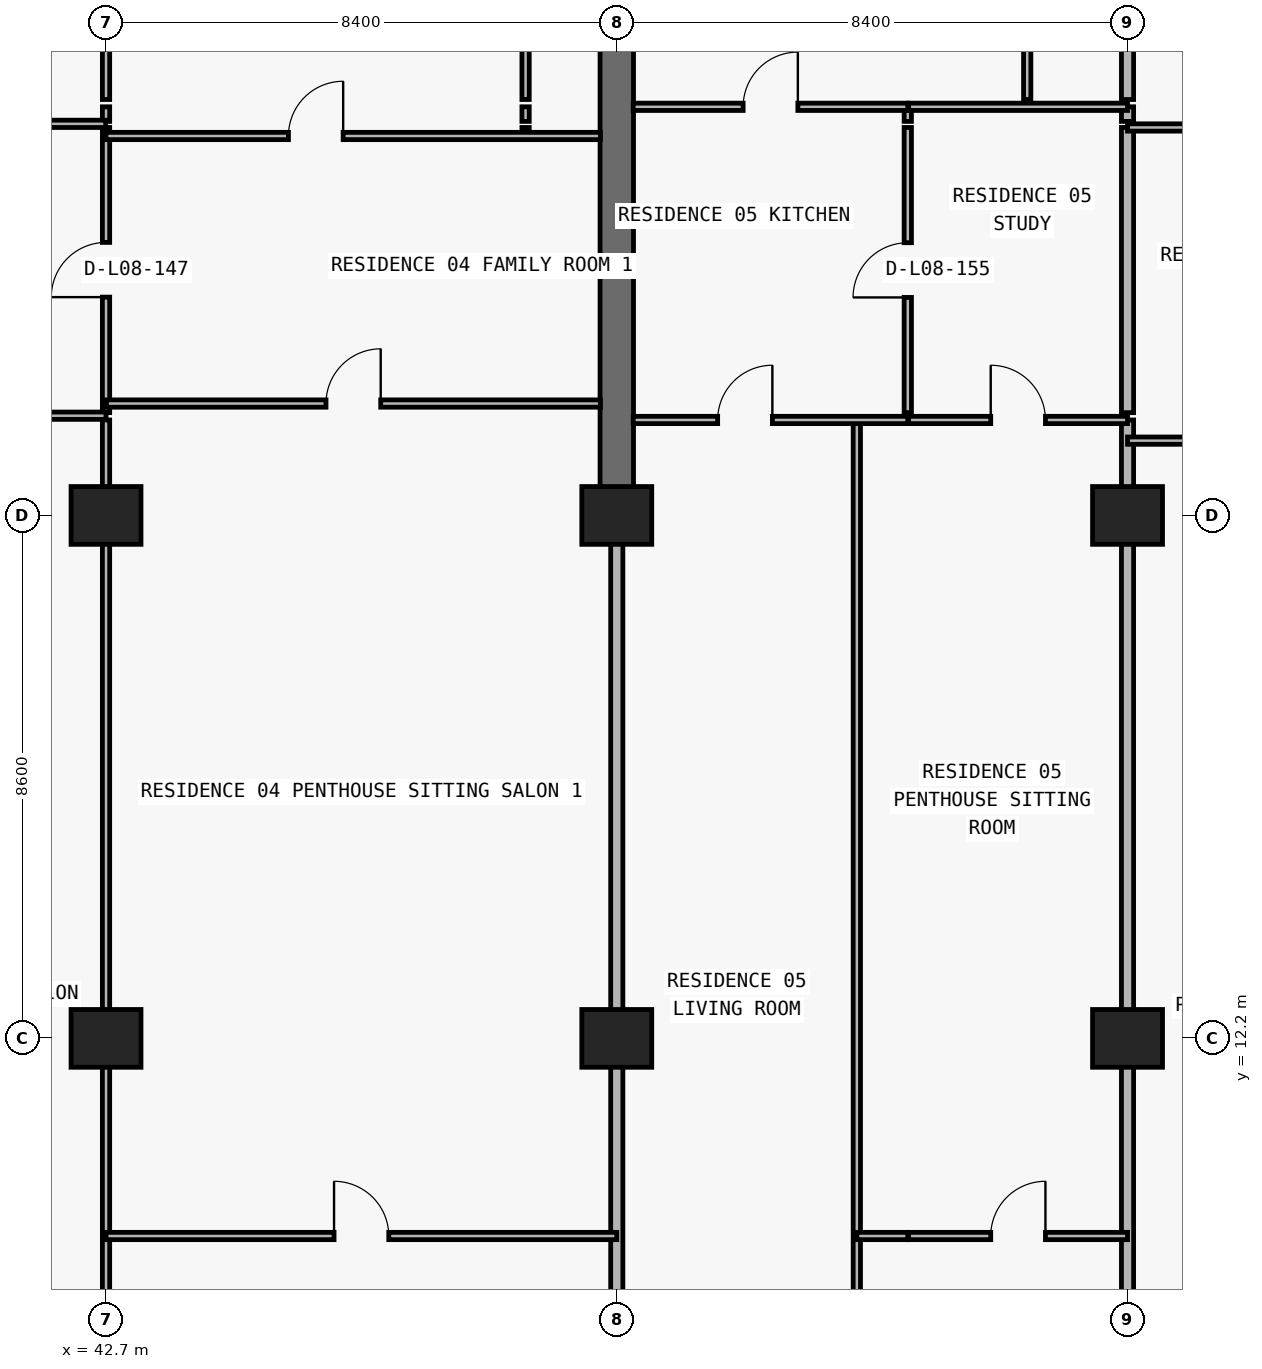
"""IFC4 building model, lengths in metres.
Left out: names, types, materials, properties, quantities, classifications, styles, units other than length and angle.
Written with IfcOpenShell. Run it as: python <this file> out.ifc"""

import sys

from ifc_helpers import new_model, si_unit, direction, frame, frame_2d, origin, origin_2d, place, context, subcontext, project, spatial, rectangle, extrude, element, fill, save


model = new_model("IFC4")
c1 = context("Model", 3, precision=1e-05, world=origin(), true_north=direction((0.0, 1.0)))
c2 = subcontext(c1, "Body", "Model", "MODEL_VIEW")
j1 = project(units=[si_unit("LENGTHUNIT", "METRE"), si_unit("PLANEANGLEUNIT", "RADIAN")], contexts=[c1])
p1 = place(None, origin())
s1 = spatial("IfcSite", under=j1, at=p1, CompositionType="ELEMENT")
p2 = place(p1, origin())
s2 = spatial("IfcBuilding", under=s1, at=p2, CompositionType="ELEMENT")
p3 = place(p2, frame((0.0, 0.0, 36.6)))
s3 = spatial("IfcBuildingStorey", under=s2, at=p3, CompositionType="ELEMENT", Elevation=36.6)
for number, where, z_axis, x_axis in (
    (1, (42.7, 12.2, 0.0), (0.0, 0.0, 1.0), (1.0, 0.0, 0.0)),
    (2, (51.1, 12.2, 0.0), (0.0, 0.0, 1.0), (1.0, 0.0, 0.0)),
    (3, (59.5, 12.2, 0.0), (0.0, 0.0, 1.0), (1.0, 0.0, 0.0)),
    (4, (42.7, 20.8, 0.0), (0.0, 0.0, 1.0), (1.0, 0.0, 0.0)),
    (5, (51.1, 20.8, 0.0), (0.0, 0.0, 1.0), (1.0, 0.0, 0.0)),
    (6, (59.5, 20.8, 0.0), (0.0, 0.0, 1.0), (1.0, 0.0, 0.0)),
):
    element("IfcColumn", number, at=place(p3, frame(where, z_axis=z_axis, x_axis=x_axis)), inside=s3, PredefinedType="COLUMN", context=c2, shape_type="SweptSolid", body=[
        extrude(rectangle(XDim=1.15, YDim=0.95, at=origin_2d()), origin(), (0.0, 0.0, 1.0), 3.05),
    ])
p4 = place(p3, frame((51.1, 20.8, 0.0), z_axis=(0.0, 0.0, 1.0), x_axis=(0.0, 1.0, 0.0)))
e7 = element("IfcWall", 7, at=p4, inside=s3, PredefinedType="SHEAR", context=c2, shape_type="SweptSolid", body=[
    extrude(rectangle(XDim=8.6, YDim=0.55, at=frame_2d((4.3, 0.0))), origin(), (0.0, 0.0, 1.0), 3.05),
])
p5 = place(p3, frame((42.7, 6.24, 0.0), z_axis=(0.0, 0.0, 1.0), x_axis=(0.0, 1.0, 0.0)))
e8 = element("IfcWall", 8, at=p5, inside=s3, PredefinedType="PARTITIONING", context=c2, shape_type="SweptSolid", body=[
    extrude(rectangle(XDim=16.13, YDim=0.12, at=frame_2d((8.065, 0.0))), origin(), (0.0, 0.0, 1.0), 2.11),
])
p6 = place(p3, frame((42.7, 22.49, 0.0), z_axis=(0.0, 0.0, 1.0), x_axis=(0.0, 1.0, 0.0)))
e9 = element("IfcWall", 9, at=p6, inside=s3, PredefinedType="PARTITIONING", context=c2, shape_type="SweptSolid", body=[
    extrude(rectangle(XDim=4.69, YDim=0.12, at=frame_2d((2.345, 0.0))), origin(), (0.0, 0.0, 1.0), 2.11),
])
p7 = place(p6, frame((1.9, 0.0, 0.0)))
e10 = element("IfcOpeningElement", 10, at=p7, cuts=e9, PredefinedType="OPENING", context=c2, shape_type="SweptSolid", body=[
    extrude(rectangle(XDim=0.9, YDim=2.06, at=frame_2d((0.45, 1.03))), frame((0.0, 0.07, 0.0), z_axis=(0.0, -1.0, 0.0), x_axis=(1.0, 0.0, 0.0)), (0.0, 0.0, 1.0), 0.14),
])
p8 = place(p3, frame((42.7, 27.28, 0.0), z_axis=(0.0, 0.0, 1.0), x_axis=(0.0, 1.0, 0.0)))
e11 = element("IfcWall", 11, at=p8, inside=s3, PredefinedType="PARTITIONING", context=c2, shape_type="SweptSolid", body=[
    extrude(rectangle(XDim=0.24, YDim=0.12, at=frame_2d((0.12, 0.0))), origin(), (0.0, 0.0, 1.0), 2.11),
])
p9 = place(p3, frame((42.7, 27.64, 0.0), z_axis=(0.0, 0.0, 1.0), x_axis=(0.0, 1.0, 0.0)))
e12 = element("IfcWall", 12, at=p9, inside=s3, PredefinedType="PARTITIONING", context=c2, shape_type="SweptSolid", body=[
    extrude(rectangle(XDim=6.86, YDim=0.12, at=frame_2d((3.43, 0.0))), origin(), (0.0, 0.0, 1.0), 2.11),
])
p10 = place(p3, frame((49.6, 27.04, 0.0), z_axis=(0.0, 0.0, 1.0), x_axis=(0.0, 1.0, 0.0)))
e13 = element("IfcWall", 13, at=p10, inside=s3, PredefinedType="PARTITIONING", context=c2, shape_type="SweptSolid", body=[
    extrude(rectangle(XDim=0.14, YDim=0.12, at=frame_2d((0.07, 0.0))), origin(), (0.0, 0.0, 1.0), 3.05),
])
p11 = place(p3, frame((49.6, 27.28, 0.0), z_axis=(0.0, 0.0, 1.0), x_axis=(0.0, 1.0, 0.0)))
e14 = element("IfcWall", 14, at=p11, inside=s3, PredefinedType="PARTITIONING", context=c2, shape_type="SweptSolid", body=[
    extrude(rectangle(XDim=0.24, YDim=0.12, at=frame_2d((0.12, 0.0))), origin(), (0.0, 0.0, 1.0), 3.05),
])
p12 = place(p3, frame((49.6, 27.64, 0.0), z_axis=(0.0, 0.0, 1.0), x_axis=(0.0, 1.0, 0.0)))
e15 = element("IfcWall", 15, at=p12, inside=s3, PredefinedType="PARTITIONING", context=c2, shape_type="SweptSolid", body=[
    extrude(rectangle(XDim=6.86, YDim=0.12, at=frame_2d((3.43, 0.0))), origin(), (0.0, 0.0, 1.0), 3.05),
])
p13 = place(p12, frame((3.005, 0.0, 0.0)))
e16 = element("IfcOpeningElement", 16, at=p13, cuts=e15, PredefinedType="OPENING", context=c2, shape_type="SweptSolid", body=[
    extrude(rectangle(XDim=0.85, YDim=2.1, at=frame_2d((0.425, 1.05))), frame((0.0, 0.07, 0.0), z_axis=(0.0, -1.0, 0.0), x_axis=(1.0, 0.0, 0.0)), (0.0, 0.0, 1.0), 0.14),
])
p14 = place(p3, frame((51.1, 6.24, 0.0), z_axis=(0.0, 0.0, 1.0), x_axis=(0.0, 1.0, 0.0)))
e17 = element("IfcWall", 17, at=p14, inside=s3, PredefinedType="PARTITIONING", context=c2, shape_type="SweptSolid", body=[
    extrude(rectangle(XDim=14.555, YDim=0.2, at=frame_2d((7.277, 0.0))), origin(), (0.0, 0.0, 1.0), 2.11),
])
p15 = place(p3, frame((55.048, 6.24, 0.0), z_axis=(0.0, 0.0, 1.0), x_axis=(0.0, 1.0, 0.0)))
e18 = element("IfcWall", 18, at=p15, inside=s3, PredefinedType="PARTITIONING", context=c2, shape_type="SweptSolid", body=[
    extrude(rectangle(XDim=16.13, YDim=0.12, at=frame_2d((8.065, 0.0))), origin(), (0.0, 0.0, 1.0), 3.05),
])
p16 = place(p3, frame((55.886, 22.49, 0.0), z_axis=(0.0, 0.0, 1.0), x_axis=(0.0, 1.0, 0.0)))
e19 = element("IfcWall", 19, at=p16, inside=s3, PredefinedType="PARTITIONING", context=c2, shape_type="SweptSolid", body=[
    extrude(rectangle(XDim=4.69, YDim=0.12, at=frame_2d((2.345, 0.0))), origin(), (0.0, 0.0, 1.0), 3.05),
])
p17 = place(p16, frame((1.895, 0.0, 0.0)))
e20 = element("IfcOpeningElement", 20, at=p17, cuts=e19, PredefinedType="OPENING", context=c2, shape_type="SweptSolid", body=[
    extrude(rectangle(XDim=0.9, YDim=2.15, at=frame_2d((0.45, 1.075))), frame((0.0, 0.07, 0.0), z_axis=(0.0, -1.0, 0.0), x_axis=(1.0, 0.0, 0.0)), (0.0, 0.0, 1.0), 0.14),
])
p18 = place(p3, frame((55.886, 27.28, 0.0), z_axis=(0.0, 0.0, 1.0), x_axis=(0.0, 1.0, 0.0)))
e21 = element("IfcWall", 21, at=p18, inside=s3, PredefinedType="PARTITIONING", context=c2, shape_type="SweptSolid", body=[
    extrude(rectangle(XDim=0.24, YDim=0.12, at=frame_2d((0.12, 0.0))), origin(), (0.0, 0.0, 1.0), 3.05),
])
p19 = place(p3, frame((57.85, 27.64, 0.0), z_axis=(0.0, 0.0, 1.0), x_axis=(0.0, 1.0, 0.0)))
e22 = element("IfcWall", 22, at=p19, inside=s3, PredefinedType="PARTITIONING", context=c2, shape_type="SweptSolid", body=[
    extrude(rectangle(XDim=6.86, YDim=0.12, at=frame_2d((3.43, 0.0))), origin(), (0.0, 0.0, 1.0), 3.05),
])
p20 = place(p19, frame((3.005, 0.0, 0.0)))
e23 = element("IfcOpeningElement", 23, at=p20, cuts=e22, PredefinedType="OPENING", context=c2, shape_type="SweptSolid", body=[
    extrude(rectangle(XDim=0.85, YDim=2.1, at=frame_2d((0.425, 1.05))), frame((0.0, 0.07, 0.0), z_axis=(0.0, -1.0, 0.0), x_axis=(1.0, 0.0, 0.0)), (0.0, 0.0, 1.0), 0.14),
])
p21 = place(p3, frame((59.5, 6.24, 0.0), z_axis=(0.0, 0.0, 1.0), x_axis=(0.0, 1.0, 0.0)))
e24 = element("IfcWall", 24, at=p21, inside=s3, PredefinedType="PARTITIONING", context=c2, shape_type="SweptSolid", body=[
    extrude(rectangle(XDim=16.13, YDim=0.2, at=frame_2d((8.065, 0.0))), origin(), (0.0, 0.0, 1.0), 2.11),
])
p22 = place(p3, frame((59.5, 22.49, 0.0), z_axis=(0.0, 0.0, 1.0), x_axis=(0.0, 1.0, 0.0)))
e25 = element("IfcWall", 25, at=p22, inside=s3, PredefinedType="PARTITIONING", context=c2, shape_type="SweptSolid", body=[
    extrude(rectangle(XDim=4.69, YDim=0.2, at=frame_2d((2.345, 0.0))), origin(), (0.0, 0.0, 1.0), 2.11),
])
p23 = place(p3, frame((59.5, 27.28, 0.0), z_axis=(0.0, 0.0, 1.0), x_axis=(0.0, 1.0, 0.0)))
e26 = element("IfcWall", 26, at=p23, inside=s3, PredefinedType="PARTITIONING", context=c2, shape_type="SweptSolid", body=[
    extrude(rectangle(XDim=0.24, YDim=0.2, at=frame_2d((0.12, 0.0))), origin(), (0.0, 0.0, 1.0), 2.11),
])
p24 = place(p3, frame((59.5, 27.64, 0.0), z_axis=(0.0, 0.0, 1.0), x_axis=(0.0, 1.0, 0.0)))
e27 = element("IfcWall", 27, at=p24, inside=s3, PredefinedType="PARTITIONING", context=c2, shape_type="SweptSolid", body=[
    extrude(rectangle(XDim=6.86, YDim=0.2, at=frame_2d((3.43, 0.0))), origin(), (0.0, 0.0, 1.0), 2.11),
])
p25 = place(p3, frame((42.7, 8.95, 0.0), z_axis=(0.0, 0.0, 1.0), x_axis=(1.0, 0.0, 0.0)))
e28 = element("IfcWall", 28, at=p25, inside=s3, PredefinedType="PARTITIONING", context=c2, shape_type="SweptSolid", body=[
    extrude(rectangle(XDim=8.4, YDim=0.12, at=frame_2d((4.2, 0.0))), origin(), (0.0, 0.0, 1.0), 3.05),
])
p26 = place(p25, frame((3.75, 0.0, 0.0)))
e29 = element("IfcOpeningElement", 29, at=p26, cuts=e28, PredefinedType="OPENING", context=c2, shape_type="SweptSolid", body=[
    extrude(rectangle(XDim=0.9, YDim=2.15, at=frame_2d((0.45, 1.075))), frame((0.0, 0.07, 0.0), z_axis=(0.0, -1.0, 0.0), x_axis=(1.0, 0.0, 0.0)), (0.0, 0.0, 1.0), 0.14),
])
p27 = place(p3, frame((55.048, 8.95, 0.0), z_axis=(0.0, 0.0, 1.0), x_axis=(1.0, 0.0, 0.0)))
e30 = element("IfcWall", 30, at=p27, inside=s3, PredefinedType="PARTITIONING", context=c2, shape_type="SweptSolid", body=[
    extrude(rectangle(XDim=0.838, YDim=0.12, at=frame_2d((0.419, 0.0))), origin(), (0.0, 0.0, 1.0), 3.05),
])
p28 = place(p3, frame((55.9, 8.95, 0.0), z_axis=(0.0, 0.0, 1.0), x_axis=(1.0, 0.0, 0.0)))
e31 = element("IfcWall", 31, at=p28, inside=s3, PredefinedType="PARTITIONING", context=c2, shape_type="SweptSolid", body=[
    extrude(rectangle(XDim=3.6, YDim=0.12, at=frame_2d((1.8, 0.0))), origin(), (0.0, 0.0, 1.0), 3.05),
])
p29 = place(p28, frame((1.35, 0.0, 0.0)))
e32 = element("IfcOpeningElement", 32, at=p29, cuts=e31, PredefinedType="OPENING", context=c2, shape_type="SweptSolid", body=[
    extrude(rectangle(XDim=0.9, YDim=2.15, at=frame_2d((0.45, 1.075))), frame((0.0, 0.07, 0.0), z_axis=(0.0, -1.0, 0.0), x_axis=(1.0, 0.0, 0.0)), (0.0, 0.0, 1.0), 0.14),
])
p30 = place(p3, frame((59.5, 22.03, 0.0), z_axis=(0.0, 0.0, 1.0), x_axis=(1.0, 0.0, 0.0)))
e33 = element("IfcWall", 33, at=p30, inside=s3, PredefinedType="PARTITIONING", context=c2, shape_type="SweptSolid", body=[
    extrude(rectangle(XDim=8.4, YDim=0.12, at=frame_2d((4.2, 0.0))), origin(), (0.0, 0.0, 1.0), 3.05),
])
p31 = place(p30, frame((1.693, 0.0, 0.0)))
e34 = element("IfcOpeningElement", 34, at=p31, cuts=e33, PredefinedType="OPENING", context=c2, shape_type="SweptSolid", body=[
    extrude(rectangle(XDim=0.9, YDim=2.15, at=frame_2d((0.45, 1.075))), frame((0.0, 0.07, 0.0), z_axis=(0.0, -1.0, 0.0), x_axis=(1.0, 0.0, 0.0)), (0.0, 0.0, 1.0), 0.14),
])
p32 = place(p30, frame((6.06, 0.0, 0.0)))
e35 = element("IfcOpeningElement", 35, at=p32, cuts=e33, PredefinedType="OPENING", context=c2, shape_type="SweptSolid", body=[
    extrude(rectangle(XDim=0.9, YDim=2.15, at=frame_2d((0.45, 1.075))), frame((0.0, 0.07, 0.0), z_axis=(0.0, -1.0, 0.0), x_axis=(1.0, 0.0, 0.0)), (0.0, 0.0, 1.0), 0.14),
])
p33 = place(p3, frame((51.37, 22.37, 0.0), z_axis=(0.0, 0.0, 1.0), x_axis=(1.0, 0.0, 0.0)))
e36 = element("IfcWall", 36, at=p33, inside=s3, PredefinedType="PARTITIONING", context=c2, shape_type="SweptSolid", body=[
    extrude(rectangle(XDim=4.516, YDim=0.12, at=frame_2d((2.258, 0.0))), origin(), (0.0, 0.0, 1.0), 3.05),
])
p34 = place(p33, frame((1.389, 0.0, 0.0)))
e37 = element("IfcOpeningElement", 37, at=p34, cuts=e36, PredefinedType="OPENING", context=c2, shape_type="SweptSolid", body=[
    extrude(rectangle(XDim=0.9, YDim=2.15, at=frame_2d((0.45, 1.075))), frame((0.0, 0.07, 0.0), z_axis=(0.0, -1.0, 0.0), x_axis=(1.0, 0.0, 0.0)), (0.0, 0.0, 1.0), 0.14),
])
p35 = place(p3, frame((55.9, 22.37, 0.0), z_axis=(0.0, 0.0, 1.0), x_axis=(1.0, 0.0, 0.0)))
e38 = element("IfcWall", 38, at=p35, inside=s3, PredefinedType="PARTITIONING", context=c2, shape_type="SweptSolid", body=[
    extrude(rectangle(XDim=3.6, YDim=0.12, at=frame_2d((1.8, 0.0))), origin(), (0.0, 0.0, 1.0), 3.05),
])
p36 = place(p35, frame((1.35, 0.0, 0.0)))
e39 = element("IfcOpeningElement", 39, at=p36, cuts=e38, PredefinedType="OPENING", context=c2, shape_type="SweptSolid", body=[
    extrude(rectangle(XDim=0.9, YDim=2.15, at=frame_2d((0.45, 1.075))), frame((0.0, 0.07, 0.0), z_axis=(0.0, -1.0, 0.0), x_axis=(1.0, 0.0, 0.0)), (0.0, 0.0, 1.0), 0.14),
])
p37 = place(p3, frame((35.1, 22.44, 0.0), z_axis=(0.0, 0.0, 1.0), x_axis=(1.0, 0.0, 0.0)))
e40 = element("IfcWall", 40, at=p37, inside=s3, PredefinedType="PARTITIONING", context=c2, shape_type="SweptSolid", body=[
    extrude(rectangle(XDim=7.6, YDim=0.12, at=frame_2d((3.8, 0.0))), origin(), (0.0, 0.0, 1.0), 3.05),
])
p38 = place(p37, frame((3.35, 0.0, 0.0)))
e41 = element("IfcOpeningElement", 41, at=p38, cuts=e40, PredefinedType="OPENING", context=c2, shape_type="SweptSolid", body=[
    extrude(rectangle(XDim=0.9, YDim=2.15, at=frame_2d((0.45, 1.075))), frame((0.0, 0.07, 0.0), z_axis=(0.0, -1.0, 0.0), x_axis=(1.0, 0.0, 0.0)), (0.0, 0.0, 1.0), 0.14),
])
p39 = place(p3, frame((42.705, 22.64, 0.0), z_axis=(0.0, 0.0, 1.0), x_axis=(1.0, 0.0, 0.0)))
e42 = element("IfcWall", 42, at=p39, inside=s3, PredefinedType="PARTITIONING", context=c2, shape_type="SweptSolid", body=[
    extrude(rectangle(XDim=8.125, YDim=0.12, at=frame_2d((4.062, 0.0))), origin(), (0.0, 0.0, 1.0), 3.05),
])
p40 = place(p39, frame((3.613, 0.0, 0.0)))
e43 = element("IfcOpeningElement", 43, at=p40, cuts=e42, PredefinedType="OPENING", context=c2, shape_type="SweptSolid", body=[
    extrude(rectangle(XDim=0.9, YDim=2.15, at=frame_2d((0.45, 1.075))), frame((0.0, 0.07, 0.0), z_axis=(0.0, -1.0, 0.0), x_axis=(1.0, 0.0, 0.0)), (0.0, 0.0, 1.0), 0.14),
])
p41 = place(p3, frame((42.7, 27.04, 0.0), z_axis=(0.0, 0.0, 1.0), x_axis=(1.0, 0.0, 0.0)))
e44 = element("IfcWall", 44, at=p41, inside=s3, PredefinedType="PARTITIONING", context=c2, shape_type="SweptSolid", body=[
    extrude(rectangle(XDim=8.13, YDim=0.12, at=frame_2d((4.065, 0.0))), origin(), (0.0, 0.0, 1.0), 3.05),
])
p42 = place(p41, frame((3.0, 0.0, 0.0)))
e45 = element("IfcOpeningElement", 45, at=p42, cuts=e44, PredefinedType="OPENING", context=c2, shape_type="SweptSolid", body=[
    extrude(rectangle(XDim=0.9, YDim=2.15, at=frame_2d((0.45, 1.075))), frame((0.0, 0.07, 0.0), z_axis=(0.0, -1.0, 0.0), x_axis=(1.0, 0.0, 0.0)), (0.0, 0.0, 1.0), 0.14),
])
p43 = place(p3, frame((59.5, 27.18, 0.0), z_axis=(0.0, 0.0, 1.0), x_axis=(1.0, 0.0, 0.0)))
e46 = element("IfcWall", 46, at=p43, inside=s3, PredefinedType="PARTITIONING", context=c2, shape_type="SweptSolid", body=[
    extrude(rectangle(XDim=8.4, YDim=0.12, at=frame_2d((4.2, 0.0))), origin(), (0.0, 0.0, 1.0), 3.05),
])
p44 = place(p43, frame((1.693, 0.0, 0.0)))
e47 = element("IfcOpeningElement", 47, at=p44, cuts=e46, PredefinedType="OPENING", context=c2, shape_type="SweptSolid", body=[
    extrude(rectangle(XDim=0.9, YDim=2.15, at=frame_2d((0.45, 1.075))), frame((0.0, 0.07, 0.0), z_axis=(0.0, -1.0, 0.0), x_axis=(1.0, 0.0, 0.0)), (0.0, 0.0, 1.0), 0.14),
])
p45 = place(p3, frame((35.1, 27.24, 0.0), z_axis=(0.0, 0.0, 1.0), x_axis=(1.0, 0.0, 0.0)))
e48 = element("IfcWall", 48, at=p45, inside=s3, PredefinedType="PARTITIONING", context=c2, shape_type="SweptSolid", body=[
    extrude(rectangle(XDim=7.595, YDim=0.12, at=frame_2d((3.797, 0.0))), origin(), (0.0, 0.0, 1.0), 3.05),
])
p46 = place(p45, frame((2.6, 0.0, 0.0)))
e49 = element("IfcOpeningElement", 49, at=p46, cuts=e48, PredefinedType="OPENING", context=c2, shape_type="SweptSolid", body=[
    extrude(rectangle(XDim=0.9, YDim=2.15, at=frame_2d((0.45, 1.075))), frame((0.0, 0.07, 0.0), z_axis=(0.0, -1.0, 0.0), x_axis=(1.0, 0.0, 0.0)), (0.0, 0.0, 1.0), 0.14),
])
p47 = place(p3, frame((51.37, 27.52, 0.0), z_axis=(0.0, 0.0, 1.0), x_axis=(1.0, 0.0, 0.0)))
e50 = element("IfcWall", 50, at=p47, inside=s3, PredefinedType="PARTITIONING", context=c2, shape_type="SweptSolid", body=[
    extrude(rectangle(XDim=4.516, YDim=0.12, at=frame_2d((2.258, 0.0))), origin(), (0.0, 0.0, 1.0), 3.05),
])
p48 = place(p47, frame((1.808, 0.0, 0.0)))
e51 = element("IfcOpeningElement", 51, at=p48, cuts=e50, PredefinedType="OPENING", context=c2, shape_type="SweptSolid", body=[
    extrude(rectangle(XDim=0.9, YDim=2.15, at=frame_2d((0.45, 1.075))), frame((0.0, 0.07, 0.0), z_axis=(0.0, -1.0, 0.0), x_axis=(1.0, 0.0, 0.0)), (0.0, 0.0, 1.0), 0.14),
])
p49 = place(p3, frame((55.9, 27.52, 0.0), z_axis=(0.0, 0.0, 1.0), x_axis=(1.0, 0.0, 0.0)))
e52 = element("IfcWall", 52, at=p49, inside=s3, PredefinedType="PARTITIONING", context=c2, shape_type="SweptSolid", body=[
    extrude(rectangle(XDim=3.6, YDim=0.12, at=frame_2d((1.8, 0.0))), origin(), (0.0, 0.0, 1.0), 3.05),
])
p50 = place(p7, origin())
e53 = element("IfcDoor", 53, at=p50, inside=s3, OperationType="SINGLE_SWING_LEFT", PredefinedType="DOOR", context=c2, shape_type="SweptSolid", body=[
    extrude(rectangle(XDim=0.9, YDim=2.06, at=frame_2d((0.45, 1.03))), frame((0.0, 0.025, 0.0), z_axis=(0.0, -1.0, 0.0), x_axis=(1.0, 0.0, 0.0)), (0.0, 0.0, 1.0), 0.05),
])
fill(e10, e53)
p51 = place(p42, origin())
e54 = element("IfcDoor", 54, at=p51, inside=s3, OperationType="SINGLE_SWING_RIGHT", PredefinedType="DOOR", context=c2, shape_type="SweptSolid", body=[
    extrude(rectangle(XDim=0.9, YDim=2.15, at=frame_2d((0.45, 1.075))), frame((0.0, 0.025, 0.0), z_axis=(0.0, -1.0, 0.0), x_axis=(1.0, 0.0, 0.0)), (0.0, 0.0, 1.0), 0.05),
])
fill(e45, e54)
p52 = place(p40, origin())
e55 = element("IfcDoor", 55, at=p52, inside=s3, OperationType="SINGLE_SWING_RIGHT", PredefinedType="DOOR", context=c2, shape_type="SweptSolid", body=[
    extrude(rectangle(XDim=0.9, YDim=2.15, at=frame_2d((0.45, 1.075))), frame((0.0, 0.025, 0.0), z_axis=(0.0, -1.0, 0.0), x_axis=(1.0, 0.0, 0.0)), (0.0, 0.0, 1.0), 0.05),
])
fill(e43, e55)
p53 = place(p26, origin())
e56 = element("IfcDoor", 56, at=p53, inside=s3, OperationType="SINGLE_SWING_LEFT", PredefinedType="DOOR", context=c2, shape_type="SweptSolid", body=[
    extrude(rectangle(XDim=0.9, YDim=2.15, at=frame_2d((0.45, 1.075))), frame((0.0, 0.025, 0.0), z_axis=(0.0, -1.0, 0.0), x_axis=(1.0, 0.0, 0.0)), (0.0, 0.0, 1.0), 0.05),
])
fill(e29, e56)
p54 = place(p48, origin())
e57 = element("IfcDoor", 57, at=p54, inside=s3, OperationType="SINGLE_SWING_RIGHT", PredefinedType="DOOR", context=c2, shape_type="SweptSolid", body=[
    extrude(rectangle(XDim=0.9, YDim=2.15, at=frame_2d((0.45, 1.075))), frame((0.0, 0.025, 0.0), z_axis=(0.0, -1.0, 0.0), x_axis=(1.0, 0.0, 0.0)), (0.0, 0.0, 1.0), 0.05),
])
fill(e51, e57)
p55 = place(p17, origin())
e58 = element("IfcDoor", 58, at=p55, inside=s3, OperationType="SINGLE_SWING_LEFT", PredefinedType="DOOR", context=c2, shape_type="SweptSolid", body=[
    extrude(rectangle(XDim=0.9, YDim=2.15, at=frame_2d((0.45, 1.075))), frame((0.0, 0.025, 0.0), z_axis=(0.0, -1.0, 0.0), x_axis=(1.0, 0.0, 0.0)), (0.0, 0.0, 1.0), 0.05),
])
fill(e20, e58)
p56 = place(p34, origin())
e59 = element("IfcDoor", 59, at=p56, inside=s3, OperationType="SINGLE_SWING_RIGHT", PredefinedType="DOOR", context=c2, shape_type="SweptSolid", body=[
    extrude(rectangle(XDim=0.9, YDim=2.15, at=frame_2d((0.45, 1.075))), frame((0.0, 0.025, 0.0), z_axis=(0.0, -1.0, 0.0), x_axis=(1.0, 0.0, 0.0)), (0.0, 0.0, 1.0), 0.05),
])
fill(e37, e59)
p57 = place(p36, origin())
e60 = element("IfcDoor", 60, at=p57, inside=s3, OperationType="SINGLE_SWING_LEFT", PredefinedType="DOOR", context=c2, shape_type="SweptSolid", body=[
    extrude(rectangle(XDim=0.9, YDim=2.15, at=frame_2d((0.45, 1.075))), frame((0.0, 0.025, 0.0), z_axis=(0.0, -1.0, 0.0), x_axis=(1.0, 0.0, 0.0)), (0.0, 0.0, 1.0), 0.05),
])
fill(e39, e60)
p58 = place(p29, origin())
e61 = element("IfcDoor", 61, at=p58, inside=s3, OperationType="SINGLE_SWING_RIGHT", PredefinedType="DOOR", context=c2, shape_type="SweptSolid", body=[
    extrude(rectangle(XDim=0.9, YDim=2.15, at=frame_2d((0.45, 1.075))), frame((0.0, 0.025, 0.0), z_axis=(0.0, -1.0, 0.0), x_axis=(1.0, 0.0, 0.0)), (0.0, 0.0, 1.0), 0.05),
])
fill(e32, e61)
save(model, sys.argv[1])
